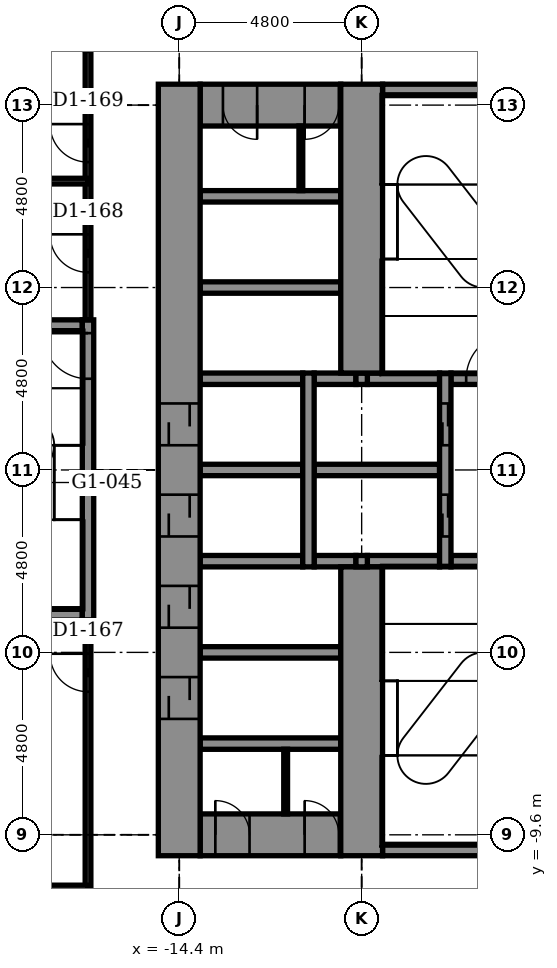
"""IFC4 building model, lengths in metres.
Left out: names, types, materials, properties, quantities, classifications, styles, units other than length and angle.
Written with IfcOpenShell. Run it as: python <this file> out.ifc"""

import sys

from ifc_helpers import new_model, si_unit, direction, frame, frame_2d, origin, place, context, subcontext, project, spatial, rectangle, extrude, element, fill, save


model = new_model("IFC4")
c1 = context("Model", 3, precision=1e-05, world=origin(), true_north=direction((0.0, 1.0)))
c2 = subcontext(c1, "Body", "Model", "MODEL_VIEW")
j1 = project(units=[si_unit("LENGTHUNIT", "METRE"), si_unit("PLANEANGLEUNIT", "RADIAN")], contexts=[c1])
p1 = place(None, origin())
s1 = spatial("IfcSite", under=j1, at=p1, CompositionType="ELEMENT")
p2 = place(p1, origin())
s2 = spatial("IfcBuilding", under=s1, at=p2, CompositionType="ELEMENT")
p3 = place(p2, frame((0.0, 0.0, 66.4)))
s3 = spatial("IfcBuildingStorey", under=s2, at=p3, CompositionType="ELEMENT", Elevation=66.4)
p4 = place(p3, frame((-9.05, -10.0, -0.3), z_axis=(0.0, 0.0, 1.0), x_axis=(1.0, 0.0, 0.0)))
e1 = element("IfcWall", 1, at=p4, inside=s3, PredefinedType="STANDARD", context=c2, shape_type="SweptSolid", body=[
    extrude(rectangle(XDim=3.8, YDim=0.3, at=frame_2d((1.9, 0.0))), origin(), (0.0, 0.0, 1.0), 5.5),
])
p5 = place(p3, frame((-13.85, -9.6, -0.3), z_axis=(0.0, 0.0, 1.0), x_axis=(1.0, 0.0, 0.0)))
e2 = element("IfcWall", 2, at=p5, inside=s3, PredefinedType="SHEAR", context=c2, shape_type="SweptSolid", body=[
    extrude(rectangle(XDim=3.7, YDim=1.1, at=frame_2d((1.85, 0.0))), origin(), (0.0, 0.0, 1.0), 5.5),
])
p6 = place(p5, frame((0.4, 0.0, 0.3)))
e3 = element("IfcOpeningElement", 3, at=p6, cuts=e2, PredefinedType="OPENING", context=c2, shape_type="SweptSolid", body=[
    extrude(rectangle(XDim=0.9, YDim=2.1, at=frame_2d((0.45, 1.05))), frame((0.0, 0.56, 0.0), z_axis=(0.0, -1.0, 0.0), x_axis=(1.0, 0.0, 0.0)), (0.0, 0.0, 1.0), 1.12),
])
p7 = place(p5, frame((2.75, 0.0, 0.3)))
e4 = element("IfcOpeningElement", 4, at=p7, cuts=e2, PredefinedType="OPENING", context=c2, shape_type="SweptSolid", body=[
    extrude(rectangle(XDim=0.9, YDim=2.1, at=frame_2d((0.45, 1.05))), frame((0.0, 0.56, 0.0), z_axis=(0.0, -1.0, 0.0), x_axis=(1.0, 0.0, 0.0)), (0.0, 0.0, 1.0), 1.12),
])
for number, where, z_axis, x_axis in (
    (5, (-13.85, -7.2, -0.3), (0.0, 0.0, 1.0), (1.0, 0.0, 0.0)),
    (6, (-13.85, -4.8, -0.3), (0.0, 0.0, 1.0), (1.0, 0.0, 0.0)),
):
    element("IfcWall", number, at=place(p3, frame(where, z_axis=z_axis, x_axis=x_axis)), inside=s3, PredefinedType="STANDARD", context=c2, shape_type="SweptSolid", body=[
        extrude(rectangle(XDim=3.7, YDim=0.3, at=frame_2d((1.85, 0.0))), origin(), (0.0, 0.0, 1.0), 5.5),
    ])
p8 = place(p3, frame((-21.45, -3.8, -0.3), z_axis=(0.0, 0.0, 1.0), x_axis=(1.0, 0.0, 0.0)))
e7 = element("IfcWall", 7, at=p8, inside=s3, PredefinedType="STANDARD", context=c2, shape_type="SweptSolid", body=[
    extrude(rectangle(XDim=4.5, YDim=0.3, at=frame_2d((2.25, 0.0))), origin(), (0.0, 0.0, 1.0), 5.5),
])
p9 = place(p3, frame((-13.85, -2.4, -0.3), z_axis=(0.0, 0.0, 1.0), x_axis=(1.0, 0.0, 0.0)))
e8 = element("IfcWall", 8, at=p9, inside=s3, PredefinedType="STANDARD", context=c2, shape_type="SweptSolid", body=[
    extrude(rectangle(XDim=2.7, YDim=0.3, at=frame_2d((1.35, 0.0))), origin(), (0.0, 0.0, 1.0), 5.5),
])
p10 = place(p3, frame((-10.85, -2.4, -0.3), z_axis=(0.0, 0.0, 1.0), x_axis=(1.0, 0.0, 0.0)))
e9 = element("IfcWall", 9, at=p10, inside=s3, PredefinedType="STANDARD", context=c2, shape_type="SweptSolid", body=[
    extrude(rectangle(XDim=1.1, YDim=0.3, at=frame_2d((0.55, 0.0))), origin(), (0.0, 0.0, 1.0), 5.5),
])
p11 = place(p3, frame((-9.45, -2.4, -0.3), z_axis=(0.0, 0.0, 1.0), x_axis=(1.0, 0.0, 0.0)))
e10 = element("IfcWall", 10, at=p11, inside=s3, PredefinedType="STANDARD", context=c2, shape_type="SweptSolid", body=[
    extrude(rectangle(XDim=1.9, YDim=0.3, at=frame_2d((0.95, 0.0))), origin(), (0.0, 0.0, 1.0), 5.5),
])
p12 = place(p3, frame((-7.25, -2.4, -0.3), z_axis=(0.0, 0.0, 1.0), x_axis=(1.0, 0.0, 0.0)))
e11 = element("IfcWall", 11, at=p12, inside=s3, PredefinedType="STANDARD", context=c2, shape_type="SweptSolid", body=[
    extrude(rectangle(XDim=2.0, YDim=0.3, at=frame_2d((1.0, 0.0))), origin(), (0.0, 0.0, 1.0), 5.5),
])
p13 = place(p3, frame((-13.85, 0.0, -0.3), z_axis=(0.0, 0.0, 1.0), x_axis=(1.0, 0.0, 0.0)))
e12 = element("IfcWall", 12, at=p13, inside=s3, PredefinedType="STANDARD", context=c2, shape_type="SweptSolid", body=[
    extrude(rectangle(XDim=2.7, YDim=0.3, at=frame_2d((1.35, 0.0))), origin(), (0.0, 0.0, 1.0), 5.5),
])
p14 = place(p3, frame((-10.85, 0.0, -0.3), z_axis=(0.0, 0.0, 1.0), x_axis=(1.0, 0.0, 0.0)))
e13 = element("IfcWall", 13, at=p14, inside=s3, PredefinedType="STANDARD", context=c2, shape_type="SweptSolid", body=[
    extrude(rectangle(XDim=3.3, YDim=0.3, at=frame_2d((1.65, 0.0))), origin(), (0.0, 0.0, 1.0), 5.5),
])
p15 = place(p3, frame((-13.85, 2.4, -0.3), z_axis=(0.0, 0.0, 1.0), x_axis=(1.0, 0.0, 0.0)))
e14 = element("IfcWall", 14, at=p15, inside=s3, PredefinedType="STANDARD", context=c2, shape_type="SweptSolid", body=[
    extrude(rectangle(XDim=2.7, YDim=0.3, at=frame_2d((1.35, 0.0))), origin(), (0.0, 0.0, 1.0), 5.5),
])
p16 = place(p3, frame((-10.85, 2.4, -0.3), z_axis=(0.0, 0.0, 1.0), x_axis=(1.0, 0.0, 0.0)))
e15 = element("IfcWall", 15, at=p16, inside=s3, PredefinedType="STANDARD", context=c2, shape_type="SweptSolid", body=[
    extrude(rectangle(XDim=1.1, YDim=0.3, at=frame_2d((0.55, 0.0))), origin(), (0.0, 0.0, 1.0), 5.5),
])
p17 = place(p3, frame((-9.45, 2.4, -0.3), z_axis=(0.0, 0.0, 1.0), x_axis=(1.0, 0.0, 0.0)))
e16 = element("IfcWall", 16, at=p17, inside=s3, PredefinedType="STANDARD", context=c2, shape_type="SweptSolid", body=[
    extrude(rectangle(XDim=1.9, YDim=0.3, at=frame_2d((0.95, 0.0))), origin(), (0.0, 0.0, 1.0), 5.5),
])
p18 = place(p3, frame((-7.25, 2.4, -0.3), z_axis=(0.0, 0.0, 1.0), x_axis=(1.0, 0.0, 0.0)))
e17 = element("IfcWall", 17, at=p18, inside=s3, PredefinedType="STANDARD", context=c2, shape_type="SweptSolid", body=[
    extrude(rectangle(XDim=2.0, YDim=0.3, at=frame_2d((1.0, 0.0))), origin(), (0.0, 0.0, 1.0), 5.5),
])
p19 = place(p18, frame((0.4, 0.0, 0.3)))
e18 = element("IfcOpeningElement", 18, at=p19, cuts=e17, PredefinedType="OPENING", context=c2, shape_type="SweptSolid", body=[
    extrude(rectangle(XDim=1.2, YDim=2.1, at=frame_2d((0.6, 1.05))), frame((0.0, 0.16, 0.0), z_axis=(0.0, -1.0, 0.0), x_axis=(1.0, 0.0, 0.0)), (0.0, 0.0, 1.0), 0.32),
])
p20 = place(p3, frame((-21.45, 3.8, -0.3), z_axis=(0.0, 0.0, 1.0), x_axis=(1.0, 0.0, 0.0)))
e19 = element("IfcWall", 19, at=p20, inside=s3, PredefinedType="STANDARD", context=c2, shape_type="SweptSolid", body=[
    extrude(rectangle(XDim=4.5, YDim=0.3, at=frame_2d((2.25, 0.0))), origin(), (0.0, 0.0, 1.0), 5.5),
])
for number, where, z_axis, x_axis in (
    (20, (-13.85, 4.8, -0.3), (0.0, 0.0, 1.0), (1.0, 0.0, 0.0)),
    (21, (-13.85, 7.2, -0.3), (0.0, 0.0, 1.0), (1.0, 0.0, 0.0)),
):
    element("IfcWall", number, at=place(p3, frame(where, z_axis=z_axis, x_axis=x_axis)), inside=s3, PredefinedType="STANDARD", context=c2, shape_type="SweptSolid", body=[
        extrude(rectangle(XDim=3.7, YDim=0.3, at=frame_2d((1.85, 0.0))), origin(), (0.0, 0.0, 1.0), 5.5),
    ])
p21 = place(p3, frame((-13.85, 9.6, -0.3), z_axis=(0.0, 0.0, 1.0), x_axis=(1.0, 0.0, 0.0)))
e22 = element("IfcWall", 22, at=p21, inside=s3, PredefinedType="SHEAR", context=c2, shape_type="SweptSolid", body=[
    extrude(rectangle(XDim=3.7, YDim=1.1, at=frame_2d((1.85, 0.0))), origin(), (0.0, 0.0, 1.0), 5.5),
])
p22 = place(p21, frame((0.6, 0.0, 0.3)))
e23 = element("IfcOpeningElement", 23, at=p22, cuts=e22, PredefinedType="OPENING", context=c2, shape_type="SweptSolid", body=[
    extrude(rectangle(XDim=0.9, YDim=2.1, at=frame_2d((0.45, 1.05))), frame((0.0, 0.56, 0.0), z_axis=(0.0, -1.0, 0.0), x_axis=(1.0, 0.0, 0.0)), (0.0, 0.0, 1.0), 1.12),
])
p23 = place(p21, frame((2.75, 0.0, 0.3)))
e24 = element("IfcOpeningElement", 24, at=p23, cuts=e22, PredefinedType="OPENING", context=c2, shape_type="SweptSolid", body=[
    extrude(rectangle(XDim=0.9, YDim=2.1, at=frame_2d((0.45, 1.05))), frame((0.0, 0.56, 0.0), z_axis=(0.0, -1.0, 0.0), x_axis=(1.0, 0.0, 0.0)), (0.0, 0.0, 1.0), 1.12),
])
p24 = place(p3, frame((-9.05, 10.0, -0.3), z_axis=(0.0, 0.0, 1.0), x_axis=(1.0, 0.0, 0.0)))
e25 = element("IfcWall", 25, at=p24, inside=s3, PredefinedType="STANDARD", context=c2, shape_type="SweptSolid", body=[
    extrude(rectangle(XDim=3.8, YDim=0.3, at=frame_2d((1.9, 0.0))), origin(), (0.0, 0.0, 1.0), 5.5),
])
p25 = place(p3, frame((-16.8, -3.95, -0.3), z_axis=(0.0, 0.0, 1.0), x_axis=(0.0, 1.0, 0.0)))
e26 = element("IfcWall", 26, at=p25, inside=s3, PredefinedType="STANDARD", context=c2, shape_type="SweptSolid", body=[
    extrude(rectangle(XDim=7.9, YDim=0.3, at=frame_2d((3.95, 0.0))), origin(), (0.0, 0.0, 1.0), 5.5),
])
p26 = place(p25, frame((6.35, 0.0, 0.3)))
e27 = element("IfcOpeningElement", 27, at=p26, cuts=e26, PredefinedType="OPENING", context=c2, shape_type="SweptSolid", body=[
    extrude(rectangle(XDim=1.2, YDim=2.1, at=frame_2d((0.6, 1.05))), frame((0.0, 0.16, 0.0), z_axis=(0.0, -1.0, 0.0), x_axis=(1.0, 0.0, 0.0)), (0.0, 0.0, 1.0), 0.32),
])
p27 = place(p3, frame((-14.4, -10.15, -0.3), z_axis=(0.0, 0.0, 1.0), x_axis=(0.0, 1.0, 0.0)))
e28 = element("IfcWall", 28, at=p27, inside=s3, PredefinedType="SHEAR", context=c2, shape_type="SweptSolid", body=[
    extrude(rectangle(XDim=20.3, YDim=1.1, at=frame_2d((10.15, 0.0))), origin(), (0.0, 0.0, 1.0), 5.5),
])
p28 = place(p27, frame((3.6, 0.0, 0.3)))
e29 = element("IfcOpeningElement", 29, at=p28, cuts=e28, PredefinedType="OPENING", context=c2, shape_type="SweptSolid", body=[
    extrude(rectangle(XDim=1.1, YDim=2.1, at=frame_2d((0.55, 1.05))), frame((0.0, 0.56, 0.0), z_axis=(0.0, -1.0, 0.0), x_axis=(1.0, 0.0, 0.0)), (0.0, 0.0, 1.0), 1.12),
])
p29 = place(p27, frame((6.0, 0.0, 0.3)))
e30 = element("IfcOpeningElement", 30, at=p29, cuts=e28, PredefinedType="OPENING", context=c2, shape_type="SweptSolid", body=[
    extrude(rectangle(XDim=1.1, YDim=2.1, at=frame_2d((0.55, 1.05))), frame((0.0, 0.56, 0.0), z_axis=(0.0, -1.0, 0.0), x_axis=(1.0, 0.0, 0.0)), (0.0, 0.0, 1.0), 1.12),
])
p30 = place(p27, frame((8.4, 0.0, 0.3)))
e31 = element("IfcOpeningElement", 31, at=p30, cuts=e28, PredefinedType="OPENING", context=c2, shape_type="SweptSolid", body=[
    extrude(rectangle(XDim=1.1, YDim=2.1, at=frame_2d((0.55, 1.05))), frame((0.0, 0.56, 0.0), z_axis=(0.0, -1.0, 0.0), x_axis=(1.0, 0.0, 0.0)), (0.0, 0.0, 1.0), 1.12),
])
p31 = place(p27, frame((10.8, 0.0, 0.3)))
e32 = element("IfcOpeningElement", 32, at=p31, cuts=e28, PredefinedType="OPENING", context=c2, shape_type="SweptSolid", body=[
    extrude(rectangle(XDim=1.1, YDim=2.1, at=frame_2d((0.55, 1.05))), frame((0.0, 0.56, 0.0), z_axis=(0.0, -1.0, 0.0), x_axis=(1.0, 0.0, 0.0)), (0.0, 0.0, 1.0), 1.12),
])
p32 = place(p3, frame((-11.0, -2.55, -0.3), z_axis=(0.0, 0.0, 1.0), x_axis=(0.0, 1.0, 0.0)))
e33 = element("IfcWall", 33, at=p32, inside=s3, PredefinedType="STANDARD", context=c2, shape_type="SweptSolid", body=[
    extrude(rectangle(XDim=5.1, YDim=0.3, at=frame_2d((2.55, 0.0))), origin(), (0.0, 0.0, 1.0), 5.5),
])
p33 = place(p3, frame((-9.6, -10.15, -0.3), z_axis=(0.0, 0.0, 1.0), x_axis=(0.0, 1.0, 0.0)))
e34 = element("IfcWall", 34, at=p33, inside=s3, PredefinedType="SHEAR", context=c2, shape_type="SweptSolid", body=[
    extrude(rectangle(XDim=7.6, YDim=1.1, at=frame_2d((3.8, 0.0))), origin(), (0.0, 0.0, 1.0), 5.5),
])
for number, where, z_axis, x_axis in (
    (35, (-9.6, -2.55, -0.3), (0.0, 0.0, 1.0), (0.0, 1.0, 0.0)),
    (36, (-9.6, 2.25, -0.3), (0.0, 0.0, 1.0), (0.0, 1.0, 0.0)),
):
    element("IfcWall", number, at=place(p3, frame(where, z_axis=z_axis, x_axis=x_axis)), inside=s3, PredefinedType="STANDARD", context=c2, shape_type="SweptSolid", body=[
        extrude(rectangle(XDim=0.3, YDim=0.3, at=frame_2d((0.15, 0.0))), origin(), (0.0, 0.0, 1.0), 5.5),
    ])
p34 = place(p3, frame((-9.6, 2.55, -0.3), z_axis=(0.0, 0.0, 1.0), x_axis=(0.0, 1.0, 0.0)))
e37 = element("IfcWall", 37, at=p34, inside=s3, PredefinedType="SHEAR", context=c2, shape_type="SweptSolid", body=[
    extrude(rectangle(XDim=7.6, YDim=1.1, at=frame_2d((3.8, 0.0))), origin(), (0.0, 0.0, 1.0), 5.5),
])
p35 = place(p3, frame((-7.4, -2.55, -0.3), z_axis=(0.0, 0.0, 1.0), x_axis=(0.0, 1.0, 0.0)))
e38 = element("IfcWall", 38, at=p35, inside=s3, PredefinedType="STANDARD", context=c2, shape_type="SweptSolid", body=[
    extrude(rectangle(XDim=5.1, YDim=0.3, at=frame_2d((2.55, 0.0))), origin(), (0.0, 0.0, 1.0), 5.5),
])
p36 = place(p35, frame((0.8, 0.0, 0.3)))
e39 = element("IfcOpeningElement", 39, at=p36, cuts=e38, PredefinedType="OPENING", context=c2, shape_type="SweptSolid", body=[
    extrude(rectangle(XDim=1.1, YDim=2.1, at=frame_2d((0.55, 1.05))), frame((0.0, 0.16, 0.0), z_axis=(0.0, -1.0, 0.0), x_axis=(1.0, 0.0, 0.0)), (0.0, 0.0, 1.0), 0.32),
])
p37 = place(p35, frame((3.2, 0.0, 0.3)))
e40 = element("IfcOpeningElement", 40, at=p37, cuts=e38, PredefinedType="OPENING", context=c2, shape_type="SweptSolid", body=[
    extrude(rectangle(XDim=1.1, YDim=2.1, at=frame_2d((0.55, 1.05))), frame((0.0, 0.16, 0.0), z_axis=(0.0, -1.0, 0.0), x_axis=(1.0, 0.0, 0.0)), (0.0, 0.0, 1.0), 0.32),
])
for number, where, z_axis, x_axis in (
    (41, (-11.2, 7.35, 0.0), (0.0, 0.0, 1.0), (0.0, 1.0, 0.0)),
    (42, (-11.6, -9.05, 0.0), (0.0, 0.0, 1.0), (0.0, 1.0, 0.0)),
):
    element("IfcWall", number, at=place(p3, frame(where, z_axis=z_axis, x_axis=x_axis)), inside=s3, PredefinedType="PARTITIONING", context=c2, shape_type="SweptSolid", body=[
        extrude(rectangle(XDim=1.7, YDim=0.1, at=frame_2d((0.85, 0.0))), origin(), (0.0, 0.0, 1.0), 5.2),
    ])
p38 = place(p3, frame((-16.8, -12.4, 0.0), z_axis=(0.0, 0.0, 1.0), x_axis=(0.0, 1.0, 0.0)))
e43 = element("IfcWall", 43, at=p38, inside=s3, PredefinedType="PARTITIONING", context=c2, shape_type="SweptSolid", body=[
    extrude(rectangle(XDim=8.45, YDim=0.15, at=frame_2d((4.225, 0.0))), origin(), (0.0, 0.0, 1.0), 5.2),
])
p39 = place(p38, frame((6.565, 0.0, 0.0)))
e44 = element("IfcOpeningElement", 44, at=p39, cuts=e43, PredefinedType="OPENING", context=c2, shape_type="SweptSolid", body=[
    extrude(rectangle(XDim=1.0, YDim=2.1, at=frame_2d((0.5, 1.05))), frame((0.0, 0.085, 0.0), z_axis=(0.0, -1.0, 0.0), x_axis=(1.0, 0.0, 0.0)), (0.0, 0.0, 1.0), 0.17),
])
p40 = place(p3, frame((-16.8, 3.95, 0.0), z_axis=(0.0, 0.0, 1.0), x_axis=(0.0, 1.0, 0.0)))
e45 = element("IfcWall", 45, at=p40, inside=s3, PredefinedType="PARTITIONING", context=c2, shape_type="SweptSolid", body=[
    extrude(rectangle(XDim=9.05, YDim=0.15, at=frame_2d((4.525, 0.0))), origin(), (0.0, 0.0, 1.0), 5.2),
])
p41 = place(p40, frame((1.25, 0.0, 0.0)))
e46 = element("IfcOpeningElement", 46, at=p41, cuts=e45, PredefinedType="OPENING", context=c2, shape_type="SweptSolid", body=[
    extrude(rectangle(XDim=1.0, YDim=2.1, at=frame_2d((0.5, 1.05))), frame((0.0, 0.085, 0.0), z_axis=(0.0, -1.0, 0.0), x_axis=(1.0, 0.0, 0.0)), (0.0, 0.0, 1.0), 0.17),
])
p42 = place(p40, frame((4.15, 0.0, 0.0)))
e47 = element("IfcOpeningElement", 47, at=p42, cuts=e45, PredefinedType="OPENING", context=c2, shape_type="SweptSolid", body=[
    extrude(rectangle(XDim=1.0, YDim=2.1, at=frame_2d((0.5, 1.05))), frame((0.0, 0.085, 0.0), z_axis=(0.0, -1.0, 0.0), x_axis=(1.0, 0.0, 0.0)), (0.0, 0.0, 1.0), 0.17),
])
p43 = place(p40, frame((7.05, 0.0, 0.0)))
e48 = element("IfcOpeningElement", 48, at=p43, cuts=e45, PredefinedType="OPENING", context=c2, shape_type="SweptSolid", body=[
    extrude(rectangle(XDim=1.0, YDim=2.1, at=frame_2d((0.5, 1.05))), frame((0.0, 0.085, 0.0), z_axis=(0.0, -1.0, 0.0), x_axis=(1.0, 0.0, 0.0)), (0.0, 0.0, 1.0), 0.17),
])
p44 = place(p3, frame((-30.178, -11.0, 0.0), z_axis=(0.0, 0.0, 1.0), x_axis=(1.0, 0.0, 0.0)))
e49 = element("IfcWall", 49, at=p44, inside=s3, PredefinedType="PARTITIONING", context=c2, shape_type="SweptSolid", body=[
    extrude(rectangle(XDim=13.378, YDim=0.15, at=frame_2d((6.689, 0.0))), origin(), (0.0, 0.0, 1.0), 5.2),
])
p45 = place(p3, frame((-32.142, 7.6, 0.0), z_axis=(0.0, 0.0, 1.0), x_axis=(1.0, 0.0, 0.0)))
e50 = element("IfcWall", 50, at=p45, inside=s3, PredefinedType="PARTITIONING", context=c2, shape_type="SweptSolid", body=[
    extrude(rectangle(XDim=15.342, YDim=0.15, at=frame_2d((7.671, 0.0))), origin(), (0.0, 0.0, 1.0), 5.2),
])
p46 = place(p3, frame((-18.6, 9.6, 0.0), z_axis=(0.0, 0.0, 1.0), x_axis=(1.0, 0.0, 0.0)))
e51 = element("IfcWall", 51, at=p46, inside=s3, PredefinedType="PARTITIONING", context=c2, shape_type="SweptSolid", body=[
    extrude(rectangle(XDim=1.8, YDim=0.15, at=frame_2d((0.9, 0.0))), origin(), (0.0, 0.0, 1.0), 4.592),
])
p47 = place(p39, origin())
e52 = element("IfcDoor", 52, at=p47, inside=s3, OperationType="SINGLE_SWING_RIGHT", PredefinedType="DOOR", context=c2, shape_type="SweptSolid", body=[
    extrude(rectangle(XDim=1.0, YDim=2.1, at=frame_2d((0.5, 1.05))), frame((0.0, 0.025, 0.0), z_axis=(0.0, -1.0, 0.0), x_axis=(1.0, 0.0, 0.0)), (0.0, 0.0, 1.0), 0.05),
])
fill(e44, e52)
p48 = place(p41, origin())
e53 = element("IfcDoor", 53, at=p48, inside=s3, OperationType="SINGLE_SWING_RIGHT", PredefinedType="DOOR", context=c2, shape_type="SweptSolid", body=[
    extrude(rectangle(XDim=1.0, YDim=2.1, at=frame_2d((0.5, 1.05))), frame((0.0, 0.025, 0.0), z_axis=(0.0, -1.0, 0.0), x_axis=(1.0, 0.0, 0.0)), (0.0, 0.0, 1.0), 0.05),
])
fill(e46, e53)
p49 = place(p42, origin())
e54 = element("IfcDoor", 54, at=p49, inside=s3, OperationType="SINGLE_SWING_RIGHT", PredefinedType="DOOR", context=c2, shape_type="SweptSolid", body=[
    extrude(rectangle(XDim=1.0, YDim=2.1, at=frame_2d((0.5, 1.05))), frame((0.0, 0.025, 0.0), z_axis=(0.0, -1.0, 0.0), x_axis=(1.0, 0.0, 0.0)), (0.0, 0.0, 1.0), 0.05),
])
fill(e47, e54)
p50 = place(p36, origin())
e55 = element("IfcDoor", 55, at=p50, inside=s3, OperationType="DOUBLE_DOOR_SLIDING", PredefinedType="DOOR", context=c2, shape_type="SweptSolid", body=[
    extrude(rectangle(XDim=1.1, YDim=2.1, at=frame_2d((0.55, 1.05))), frame((0.0, 0.025, 0.0), z_axis=(0.0, -1.0, 0.0), x_axis=(1.0, 0.0, 0.0)), (0.0, 0.0, 1.0), 0.05),
])
fill(e39, e55)
p51 = place(p37, origin())
e56 = element("IfcDoor", 56, at=p51, inside=s3, OperationType="DOUBLE_DOOR_SLIDING", PredefinedType="DOOR", context=c2, shape_type="SweptSolid", body=[
    extrude(rectangle(XDim=1.1, YDim=2.1, at=frame_2d((0.55, 1.05))), frame((0.0, 0.025, 0.0), z_axis=(0.0, -1.0, 0.0), x_axis=(1.0, 0.0, 0.0)), (0.0, 0.0, 1.0), 0.05),
])
fill(e40, e56)
p52 = place(p28, origin())
e57 = element("IfcDoor", 57, at=p52, inside=s3, OperationType="DOUBLE_DOOR_SLIDING", PredefinedType="DOOR", context=c2, shape_type="SweptSolid", body=[
    extrude(rectangle(XDim=1.1, YDim=2.1, at=frame_2d((0.55, 1.05))), frame((0.0, 0.025, 0.0), z_axis=(0.0, -1.0, 0.0), x_axis=(1.0, 0.0, 0.0)), (0.0, 0.0, 1.0), 0.05),
])
fill(e29, e57)
p53 = place(p29, origin())
e58 = element("IfcDoor", 58, at=p53, inside=s3, OperationType="DOUBLE_DOOR_SLIDING", PredefinedType="DOOR", context=c2, shape_type="SweptSolid", body=[
    extrude(rectangle(XDim=1.1, YDim=2.1, at=frame_2d((0.55, 1.05))), frame((0.0, 0.025, 0.0), z_axis=(0.0, -1.0, 0.0), x_axis=(1.0, 0.0, 0.0)), (0.0, 0.0, 1.0), 0.05),
])
fill(e30, e58)
p54 = place(p30, origin())
e59 = element("IfcDoor", 59, at=p54, inside=s3, OperationType="DOUBLE_DOOR_SLIDING", PredefinedType="DOOR", context=c2, shape_type="SweptSolid", body=[
    extrude(rectangle(XDim=1.1, YDim=2.1, at=frame_2d((0.55, 1.05))), frame((0.0, 0.025, 0.0), z_axis=(0.0, -1.0, 0.0), x_axis=(1.0, 0.0, 0.0)), (0.0, 0.0, 1.0), 0.05),
])
fill(e31, e59)
p55 = place(p31, origin())
e60 = element("IfcDoor", 60, at=p55, inside=s3, OperationType="DOUBLE_DOOR_SLIDING", PredefinedType="DOOR", context=c2, shape_type="SweptSolid", body=[
    extrude(rectangle(XDim=1.1, YDim=2.1, at=frame_2d((0.55, 1.05))), frame((0.0, 0.025, 0.0), z_axis=(0.0, -1.0, 0.0), x_axis=(1.0, 0.0, 0.0)), (0.0, 0.0, 1.0), 0.05),
])
fill(e32, e60)
p56 = place(p26, origin())
e61 = element("IfcDoor", 61, at=p56, inside=s3, OperationType="SINGLE_SWING_RIGHT", PredefinedType="DOOR", context=c2, shape_type="SweptSolid", body=[
    extrude(rectangle(XDim=1.2, YDim=2.1, at=frame_2d((0.6, 1.05))), frame((0.0, 0.025, 0.0), z_axis=(0.0, -1.0, 0.0), x_axis=(1.0, 0.0, 0.0)), (0.0, 0.0, 1.0), 0.05),
])
fill(e27, e61)
p57 = place(p6, origin())
e62 = element("IfcDoor", 62, at=p57, inside=s3, OperationType="SINGLE_SWING_LEFT", PredefinedType="DOOR", context=c2, shape_type="SweptSolid", body=[
    extrude(rectangle(XDim=0.9, YDim=2.1, at=frame_2d((0.45, 1.05))), frame((0.0, 0.025, 0.0), z_axis=(0.0, -1.0, 0.0), x_axis=(1.0, 0.0, 0.0)), (0.0, 0.0, 1.0), 0.05),
])
fill(e3, e62)
p58 = place(p7, origin())
e63 = element("IfcDoor", 63, at=p58, inside=s3, OperationType="SINGLE_SWING_LEFT", PredefinedType="DOOR", context=c2, shape_type="SweptSolid", body=[
    extrude(rectangle(XDim=0.9, YDim=2.1, at=frame_2d((0.45, 1.05))), frame((0.0, 0.025, 0.0), z_axis=(0.0, -1.0, 0.0), x_axis=(1.0, 0.0, 0.0)), (0.0, 0.0, 1.0), 0.05),
])
fill(e4, e63)
p59 = place(p22, frame((0.9, 0.0, 0.0), z_axis=(0.0, 0.0, 1.0), x_axis=(-1.0, 0.0, 0.0)))
e64 = element("IfcDoor", 64, at=p59, inside=s3, OperationType="SINGLE_SWING_RIGHT", PredefinedType="DOOR", context=c2, shape_type="SweptSolid", body=[
    extrude(rectangle(XDim=0.9, YDim=2.1, at=frame_2d((0.45, 1.05))), frame((0.0, 0.025, 0.0), z_axis=(0.0, -1.0, 0.0), x_axis=(1.0, 0.0, 0.0)), (0.0, 0.0, 1.0), 0.05),
])
fill(e23, e64)
p60 = place(p23, frame((0.9, 0.0, 0.0), z_axis=(0.0, 0.0, 1.0), x_axis=(-1.0, 0.0, 0.0)))
e65 = element("IfcDoor", 65, at=p60, inside=s3, OperationType="SINGLE_SWING_LEFT", PredefinedType="DOOR", context=c2, shape_type="SweptSolid", body=[
    extrude(rectangle(XDim=0.9, YDim=2.1, at=frame_2d((0.45, 1.05))), frame((0.0, 0.025, 0.0), z_axis=(0.0, -1.0, 0.0), x_axis=(1.0, 0.0, 0.0)), (0.0, 0.0, 1.0), 0.05),
])
fill(e24, e65)
p61 = place(p19, origin())
e66 = element("IfcDoor", 66, at=p61, inside=s3, OperationType="SINGLE_SWING_RIGHT", PredefinedType="DOOR", context=c2, shape_type="SweptSolid", body=[
    extrude(rectangle(XDim=1.2, YDim=2.1, at=frame_2d((0.6, 1.05))), frame((0.0, 0.025, 0.0), z_axis=(0.0, -1.0, 0.0), x_axis=(1.0, 0.0, 0.0)), (0.0, 0.0, 1.0), 0.05),
])
fill(e18, e66)
save(model, sys.argv[1])
